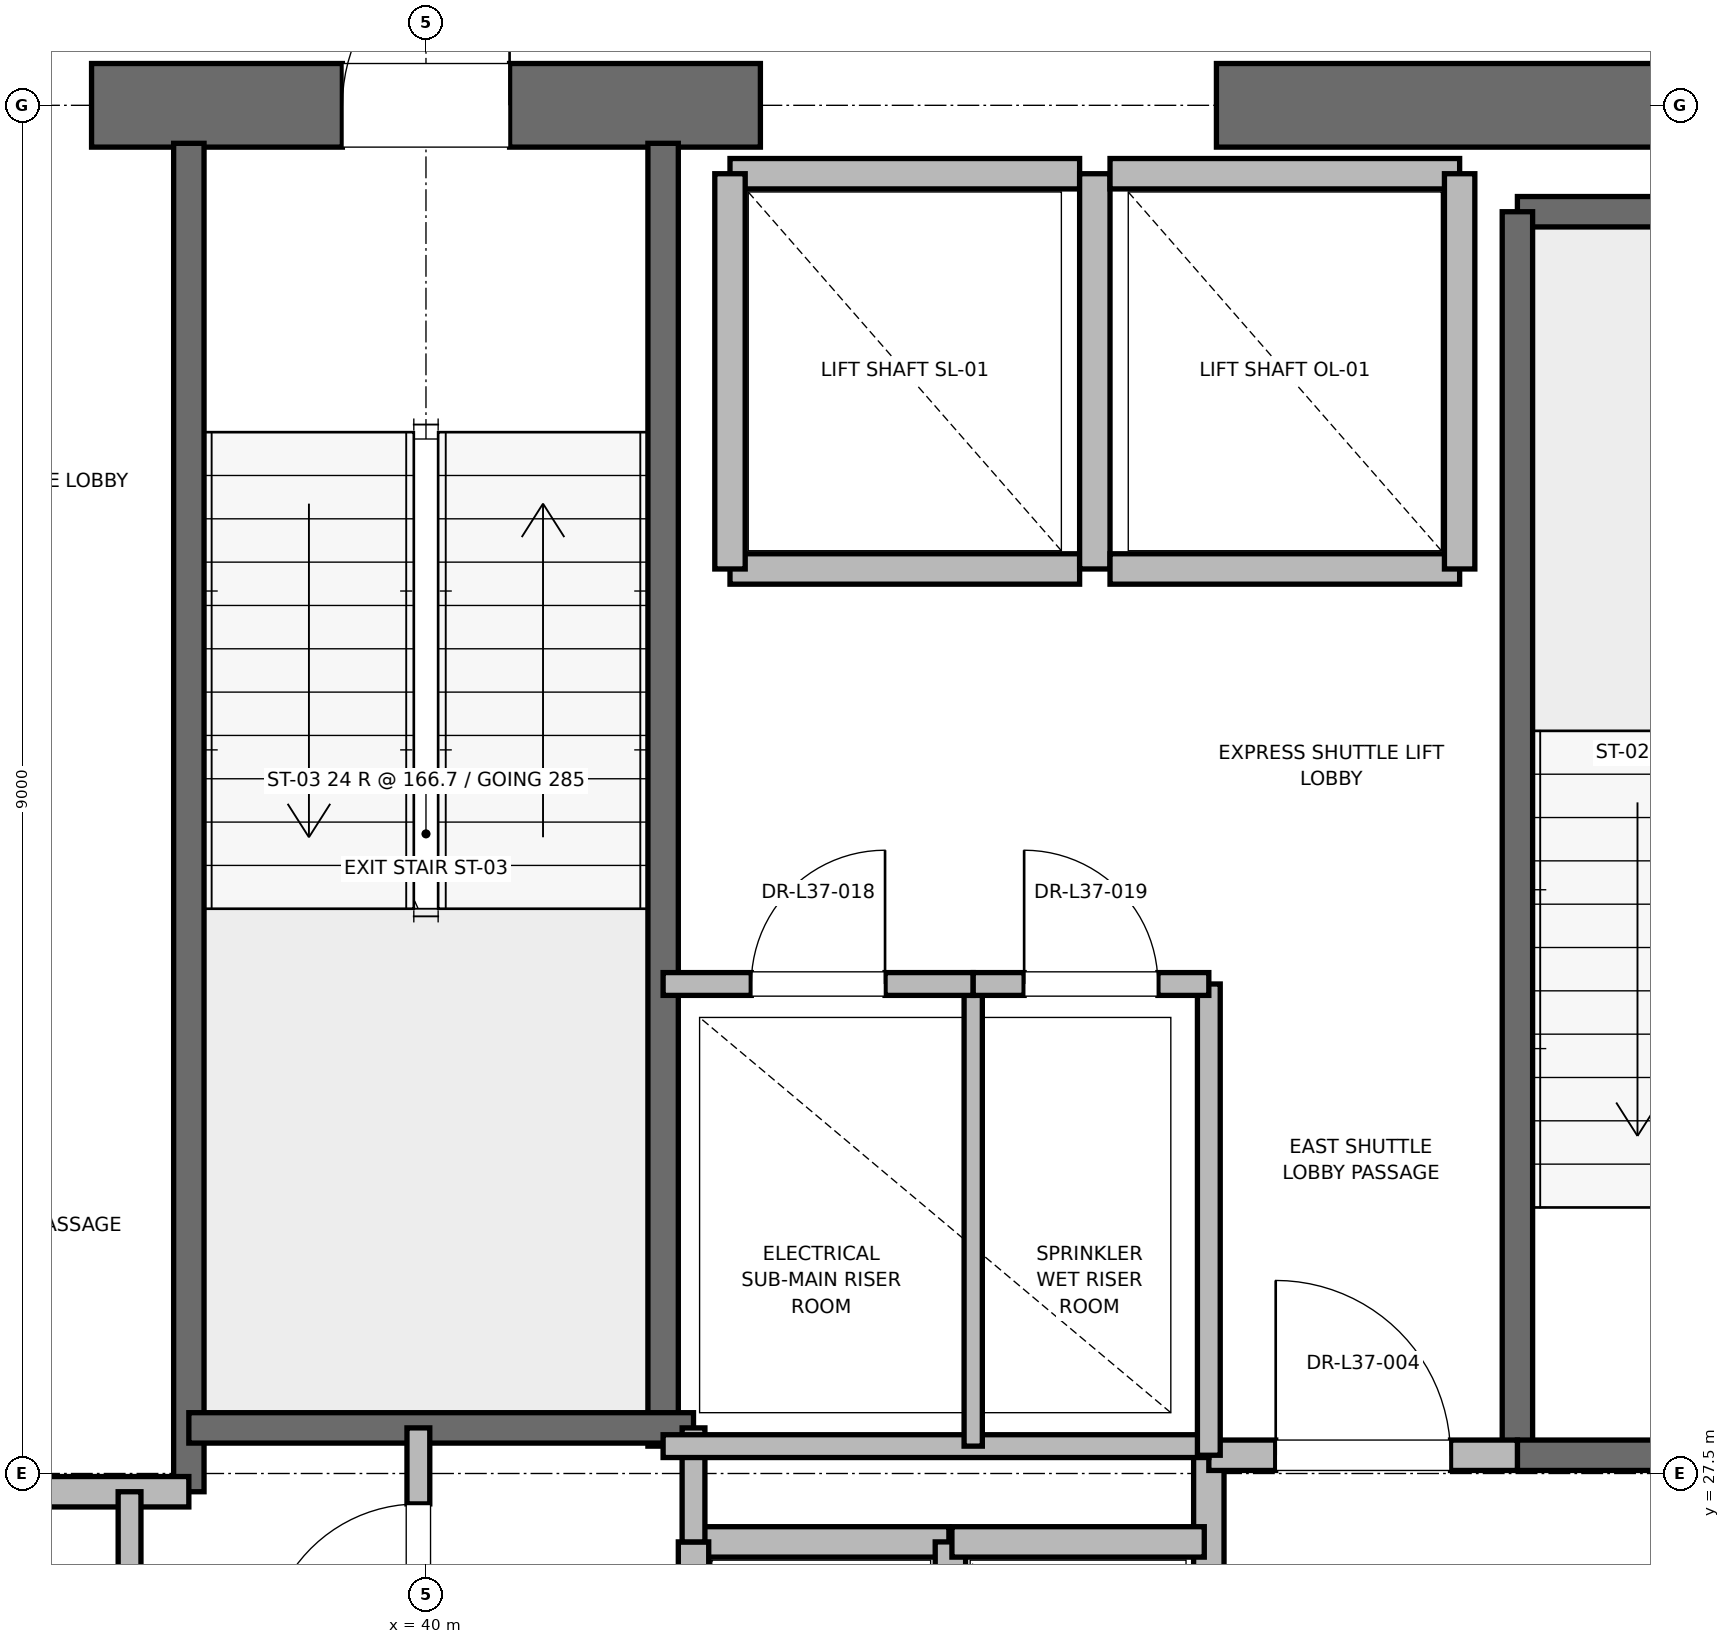
"""IFC4 building model, lengths in metres.
Left out: names, types, materials, properties, quantities, classifications, styles, units other than length and angle.
Written with IfcOpenShell. Run it as: python <this file> out.ifc"""

import sys

from ifc_helpers import new_model, si_unit, direction, frame, frame_2d, origin, place, context, subcontext, project, spatial, rectangle, extrude, element, fill, save


model = new_model("IFC4")
c1 = context("Model", 3, precision=1e-05, world=origin(), true_north=direction((0.0, 1.0)))
c2 = subcontext(c1, "Body", "Model", "MODEL_VIEW")
j1 = project(units=[si_unit("LENGTHUNIT", "METRE"), si_unit("PLANEANGLEUNIT", "RADIAN")], contexts=[c1])
p1 = place(None, origin())
s1 = spatial("IfcSite", under=j1, at=p1, CompositionType="ELEMENT")
p2 = place(p1, origin())
s2 = spatial("IfcBuilding", under=s1, at=p2, CompositionType="ELEMENT")
p3 = place(p2, frame((0.0, 0.0, 160.4)))
s3 = spatial("IfcBuildingStorey", under=s2, at=p3, CompositionType="ELEMENT", Elevation=160.4)
p4 = place(p3, frame((37.8, 36.5, 0.0), z_axis=(0.0, 0.0, 1.0), x_axis=(1.0, 0.0, 0.0)))
e1 = element("IfcWall", 1, at=p4, inside=s3, PredefinedType="SHEAR", context=c2, shape_type="SweptSolid", body=[
    extrude(rectangle(XDim=4.4, YDim=0.55, at=frame_2d((2.2, 0.0))), origin(), (0.0, 0.0, 1.0), 3.775),
])
p5 = place(p4, frame((1.65, 0.0, 0.0)))
e2 = element("IfcOpeningElement", 2, at=p5, cuts=e1, PredefinedType="OPENING", context=c2, shape_type="SweptSolid", body=[
    extrude(rectangle(XDim=1.1, YDim=2.15, at=frame_2d((0.55, 1.075))), frame((0.0, 0.275, 0.0), z_axis=(0.0, -1.0, 0.0), x_axis=(1.0, 0.0, 0.0)), (0.0, 0.0, 1.0), 0.55),
])
p6 = place(p3, frame((45.2, 36.5, 0.0), z_axis=(0.0, 0.0, 1.0), x_axis=(1.0, 0.0, 0.0)))
e3 = element("IfcWall", 3, at=p6, inside=s3, PredefinedType="SHEAR", context=c2, shape_type="SweptSolid", body=[
    extrude(rectangle(XDim=5.8, YDim=0.55, at=frame_2d((2.9, 0.0))), origin(), (0.0, 0.0, 1.0), 3.775),
])
p7 = place(p3, frame((47.18, 35.8, 0.0), z_axis=(0.0, 0.0, 1.0), x_axis=(1.0, 0.0, 0.0)))
e4 = element("IfcWall", 4, at=p7, inside=s3, PredefinedType="SOLIDWALL", context=c2, shape_type="SweptSolid", body=[
    extrude(rectangle(XDim=3.12, YDim=0.2, at=frame_2d((1.56, 0.0))), origin(), (0.0, 0.0, 1.0), 3.775),
])
p8 = place(p3, frame((47.18, 27.62, 0.0), z_axis=(0.0, 0.0, 1.0), x_axis=(0.0, 1.0, 0.0)))
e5 = element("IfcWall", 5, at=p8, inside=s3, PredefinedType="SOLIDWALL", context=c2, shape_type="SweptSolid", body=[
    extrude(rectangle(XDim=8.18, YDim=0.2, at=frame_2d((4.09, 0.0))), origin(), (0.0, 0.0, 1.0), 3.775),
])
p9 = place(p3, frame((47.18, 27.62, 0.0), z_axis=(0.0, 0.0, 1.0), x_axis=(1.0, 0.0, 0.0)))
e6 = element("IfcWall", 6, at=p9, inside=s3, PredefinedType="SOLIDWALL", context=c2, shape_type="SweptSolid", body=[
    extrude(rectangle(XDim=3.12, YDim=0.2, at=frame_2d((1.56, 0.0))), origin(), (0.0, 0.0, 1.0), 3.775),
])
p10 = place(p9, frame((1.01, 0.0, 0.0)))
e7 = element("IfcOpeningElement", 7, at=p10, cuts=e6, PredefinedType="OPENING", context=c2, shape_type="SweptSolid", body=[
    extrude(rectangle(XDim=1.1, YDim=2.15, at=frame_2d((0.55, 1.075))), frame((0.0, 0.1, 0.0), z_axis=(0.0, -1.0, 0.0), x_axis=(1.0, 0.0, 0.0)), (0.0, 0.0, 1.0), 0.2),
])
p11 = place(p3, frame((38.44, 27.38, 0.0), z_axis=(0.0, 0.0, 1.0), x_axis=(0.0, 1.0, 0.0)))
e8 = element("IfcWall", 8, at=p11, inside=s3, PredefinedType="SOLIDWALL", context=c2, shape_type="SweptSolid", body=[
    extrude(rectangle(XDim=8.87, YDim=0.2, at=frame_2d((4.435, 0.0))), origin(), (0.0, 0.0, 1.0), 3.775),
])
p12 = place(p3, frame((41.56, 27.68, 0.0), z_axis=(0.0, 0.0, 1.0), x_axis=(0.0, 1.0, 0.0)))
e9 = element("IfcWall", 9, at=p12, inside=s3, PredefinedType="SOLIDWALL", context=c2, shape_type="SweptSolid", body=[
    extrude(rectangle(XDim=8.57, YDim=0.2, at=frame_2d((4.285, 0.0))), origin(), (0.0, 0.0, 1.0), 3.775),
])
p13 = place(p3, frame((38.44, 27.8, 0.0), z_axis=(0.0, 0.0, 1.0), x_axis=(1.0, 0.0, 0.0)))
e10 = element("IfcWall", 10, at=p13, inside=s3, PredefinedType="SOLIDWALL", context=c2, shape_type="SweptSolid", body=[
    extrude(rectangle(XDim=3.32, YDim=0.2, at=frame_2d((1.66, 0.0))), origin(), (0.0, 0.0, 1.0), 3.775),
])
p14 = place(p3, frame((32.82, 27.38, 0.0), z_axis=(0.0, 0.0, 1.0), x_axis=(1.0, 0.0, 0.0)))
e11 = element("IfcWall", 11, at=p14, inside=s3, PredefinedType="PARTITIONING", context=c2, shape_type="SweptSolid", body=[
    extrude(rectangle(XDim=5.62, YDim=0.2, at=frame_2d((2.81, 0.0))), origin(), (0.0, 0.0, 1.0), 3.775),
])
p15 = place(p3, frame((45.15, 24.25, 0.0), z_axis=(0.0, 0.0, 1.0), x_axis=(0.0, 1.0, 0.0)))
e12 = element("IfcWall", 12, at=p15, inside=s3, PredefinedType="PARTITIONING", context=c2, shape_type="SweptSolid", body=[
    extrude(rectangle(XDim=3.37, YDim=0.2, at=frame_2d((1.685, 0.0))), origin(), (0.0, 0.0, 1.0), 3.775),
])
p16 = place(p3, frame((45.15, 27.62, 0.0), z_axis=(0.0, 0.0, 1.0), x_axis=(1.0, 0.0, 0.0)))
e13 = element("IfcWall", 13, at=p16, inside=s3, PredefinedType="PARTITIONING", context=c2, shape_type="SweptSolid", body=[
    extrude(rectangle(XDim=2.03, YDim=0.2, at=frame_2d((1.015, 0.0))), origin(), (0.0, 0.0, 1.0), 3.775),
])
p17 = place(p16, frame((0.44, 0.0, 0.0)))
e14 = element("IfcOpeningElement", 14, at=p17, cuts=e13, PredefinedType="OPENING", context=c2, shape_type="SweptSolid", body=[
    extrude(rectangle(XDim=1.15, YDim=2.2, at=frame_2d((0.575, 1.1))), frame((0.0, 0.1, 0.0), z_axis=(0.0, -1.0, 0.0), x_axis=(1.0, 0.0, 0.0)), (0.0, 0.0, 1.0), 0.2),
])
p18 = place(p3, frame((43.44, 27.05, 0.0), z_axis=(0.0, 0.0, 1.0), x_axis=(-1.0, 0.0, 0.0)))
e15 = element("IfcWall", 15, at=p18, inside=s3, PredefinedType="SOLIDWALL", context=c2, shape_type="SweptSolid", body=[
    extrude(rectangle(XDim=1.68, YDim=0.2, at=frame_2d((0.84, 0.0))), origin(), (0.0, 0.0, 1.0), 3.775),
])
for number, where, z_axis, x_axis in (
    (16, (41.76, 27.05, 0.0), (0.0, 0.0, 1.0), (0.0, -1.0, 0.0)),
    (17, (43.45, 24.45, 0.0), (0.0, 0.0, 1.0), (0.0, 1.0, 0.0)),
):
    element("IfcWall", number, at=place(p3, frame(where, z_axis=z_axis, x_axis=x_axis)), inside=s3, PredefinedType="SOLIDWALL", context=c2, shape_type="SweptSolid", body=[
        extrude(rectangle(XDim=2.6, YDim=0.2, at=frame_2d((1.3, 0.0))), origin(), (0.0, 0.0, 1.0), 3.775),
    ])
p19 = place(p3, frame((45.12, 27.05, 0.0), z_axis=(0.0, 0.0, 1.0), x_axis=(-1.0, 0.0, 0.0)))
e18 = element("IfcWall", 18, at=p19, inside=s3, PredefinedType="SOLIDWALL", context=c2, shape_type="SweptSolid", body=[
    extrude(rectangle(XDim=1.66, YDim=0.2, at=frame_2d((0.83, 0.0))), origin(), (0.0, 0.0, 1.0), 3.775),
])
p20 = place(p3, frame((42.0, 33.45, 0.0), z_axis=(0.0, 0.0, 1.0), x_axis=(1.0, 0.0, 0.0)))
e19 = element("IfcWall", 19, at=p20, inside=s3, PredefinedType="SOLIDWALL", context=c2, shape_type="SweptSolid", body=[
    extrude(rectangle(XDim=2.3, YDim=0.2, at=frame_2d((1.15, 0.0))), origin(), (0.0, 0.0, 1.0), 3.775),
])
p21 = place(p3, frame((44.3, 36.05, 0.0), z_axis=(0.0, 0.0, 1.0), x_axis=(-1.0, 0.0, 0.0)))
e20 = element("IfcWall", 20, at=p21, inside=s3, PredefinedType="SOLIDWALL", context=c2, shape_type="SweptSolid", body=[
    extrude(rectangle(XDim=2.3, YDim=0.2, at=frame_2d((1.15, 0.0))), origin(), (0.0, 0.0, 1.0), 2.755),
])
for number, where, z_axis, x_axis in (
    (21, (42.0, 36.05, 0.0), (0.0, 0.0, 1.0), (0.0, -1.0, 0.0)),
    (22, (44.4, 33.45, 0.0), (0.0, 0.0, 1.0), (0.0, 1.0, 0.0)),
):
    element("IfcWall", number, at=place(p3, frame(where, z_axis=z_axis, x_axis=x_axis)), inside=s3, PredefinedType="SOLIDWALL", context=c2, shape_type="SweptSolid", body=[
        extrude(rectangle(XDim=2.6, YDim=0.2, at=frame_2d((1.3, 0.0))), origin(), (0.0, 0.0, 1.0), 2.755),
    ])
p22 = place(p3, frame((44.5, 33.45, 0.0), z_axis=(0.0, 0.0, 1.0), x_axis=(1.0, 0.0, 0.0)))
e23 = element("IfcWall", 23, at=p22, inside=s3, PredefinedType="SOLIDWALL", context=c2, shape_type="SweptSolid", body=[
    extrude(rectangle(XDim=2.3, YDim=0.2, at=frame_2d((1.15, 0.0))), origin(), (0.0, 0.0, 1.0), 3.775),
])
p23 = place(p3, frame((46.8, 36.05, 0.0), z_axis=(0.0, 0.0, 1.0), x_axis=(-1.0, 0.0, 0.0)))
e24 = element("IfcWall", 24, at=p23, inside=s3, PredefinedType="SOLIDWALL", context=c2, shape_type="SweptSolid", body=[
    extrude(rectangle(XDim=2.3, YDim=0.2, at=frame_2d((1.15, 0.0))), origin(), (0.0, 0.0, 1.0), 2.755),
])
p24 = place(p3, frame((46.8, 33.45, 0.0), z_axis=(0.0, 0.0, 1.0), x_axis=(0.0, 1.0, 0.0)))
e25 = element("IfcWall", 25, at=p24, inside=s3, PredefinedType="SOLIDWALL", context=c2, shape_type="SweptSolid", body=[
    extrude(rectangle(XDim=2.6, YDim=0.2, at=frame_2d((1.3, 0.0))), origin(), (0.0, 0.0, 1.0), 3.775),
])
p25 = place(p3, frame((41.76, 27.05, 0.0), z_axis=(0.0, 0.0, 1.0), x_axis=(0.0, 1.0, 0.0)))
e26 = element("IfcWall", 26, at=p25, inside=s3, PredefinedType="PARTITIONING", context=c2, shape_type="SweptSolid", body=[
    extrude(rectangle(XDim=0.75, YDim=0.15, at=frame_2d((0.375, 0.0))), origin(), (0.0, 0.0, 1.0), 2.85),
])
p26 = place(p3, frame((39.95, 25.8, 0.0), z_axis=(0.0, 0.0, 1.0), x_axis=(0.0, 1.0, 0.0)))
e27 = element("IfcWall", 27, at=p26, inside=s3, PredefinedType="PARTITIONING", context=c2, shape_type="SweptSolid", body=[
    extrude(rectangle(XDim=2.0, YDim=0.15, at=frame_2d((1.0, 0.0))), origin(), (0.0, 0.0, 1.0), 2.85),
])
p27 = place(p26, frame((0.5, 0.0, 0.0)))
e28 = element("IfcOpeningElement", 28, at=p27, cuts=e27, PredefinedType="OPENING", context=c2, shape_type="SweptSolid", body=[
    extrude(rectangle(XDim=1.0, YDim=2.15, at=frame_2d((0.5, 1.075))), frame((0.0, 0.075, 0.0), z_axis=(0.0, -1.0, 0.0), x_axis=(1.0, 0.0, 0.0)), (0.0, 0.0, 1.0), 0.15),
])
p28 = place(p3, frame((38.05, 24.5, 0.0), z_axis=(0.0, 0.0, 1.0), x_axis=(0.0, 1.0, 0.0)))
e29 = element("IfcWall", 29, at=p28, inside=s3, PredefinedType="PARTITIONING", context=c2, shape_type="SweptSolid", body=[
    extrude(rectangle(XDim=2.88, YDim=0.15, at=frame_2d((1.44, 0.0))), origin(), (0.0, 0.0, 1.0), 2.85),
])
p29 = place(p28, frame((0.94, 0.0, 0.0)))
e30 = element("IfcOpeningElement", 30, at=p29, cuts=e29, PredefinedType="OPENING", context=c2, shape_type="SweptSolid", body=[
    extrude(rectangle(XDim=1.0, YDim=2.15, at=frame_2d((0.5, 1.075))), frame((0.0, 0.075, 0.0), z_axis=(0.0, -1.0, 0.0), x_axis=(1.0, 0.0, 0.0)), (0.0, 0.0, 1.0), 0.15),
])
p30 = place(p3, frame((41.56, 27.68, 0.0), z_axis=(0.0, 0.0, 1.0), x_axis=(1.0, 0.0, 0.0)))
e31 = element("IfcWall", 31, at=p30, inside=s3, PredefinedType="PARTITIONING", context=c2, shape_type="SweptSolid", body=[
    extrude(rectangle(XDim=3.59, YDim=0.15, at=frame_2d((1.795, 0.0))), origin(), (0.0, 0.0, 1.0), 2.85),
])
p31 = place(p3, frame((45.15, 27.62, 0.0), z_axis=(0.0, 0.0, 1.0), x_axis=(0.0, 1.0, 0.0)))
e32 = element("IfcWall", 32, at=p31, inside=s3, PredefinedType="PARTITIONING", context=c2, shape_type="SweptSolid", body=[
    extrude(rectangle(XDim=3.1, YDim=0.15, at=frame_2d((1.55, 0.0))), origin(), (0.0, 0.0, 1.0), 2.85),
])
p32 = place(p3, frame((43.6, 27.68, 0.0), z_axis=(0.0, 0.0, 1.0), x_axis=(0.0, 1.0, 0.0)))
e33 = element("IfcWall", 33, at=p32, inside=s3, PredefinedType="PARTITIONING", context=c2, shape_type="SweptSolid", body=[
    extrude(rectangle(XDim=3.04, YDim=0.12, at=frame_2d((1.52, 0.0))), origin(), (0.0, 0.0, 1.0), 2.85),
])
p33 = place(p3, frame((41.56, 30.72, 0.0), z_axis=(0.0, 0.0, 1.0), x_axis=(1.0, 0.0, 0.0)))
e34 = element("IfcWall", 34, at=p33, inside=s3, PredefinedType="PARTITIONING", context=c2, shape_type="SweptSolid", body=[
    extrude(rectangle(XDim=2.04, YDim=0.15, at=frame_2d((1.02, 0.0))), origin(), (0.0, 0.0, 1.0), 2.85),
])
p34 = place(p33, frame((0.58, 0.0, 0.0)))
e35 = element("IfcOpeningElement", 35, at=p34, cuts=e34, PredefinedType="OPENING", context=c2, shape_type="SweptSolid", body=[
    extrude(rectangle(XDim=0.88, YDim=2.1, at=frame_2d((0.44, 1.05))), frame((0.0, 0.075, 0.0), z_axis=(0.0, -1.0, 0.0), x_axis=(1.0, 0.0, 0.0)), (0.0, 0.0, 1.0), 0.15),
])
p35 = place(p3, frame((43.6, 30.72, 0.0), z_axis=(0.0, 0.0, 1.0), x_axis=(1.0, 0.0, 0.0)))
e36 = element("IfcWall", 36, at=p35, inside=s3, PredefinedType="PARTITIONING", context=c2, shape_type="SweptSolid", body=[
    extrude(rectangle(XDim=1.55, YDim=0.15, at=frame_2d((0.775, 0.0))), origin(), (0.0, 0.0, 1.0), 2.85),
])
p36 = place(p35, frame((0.335, 0.0, 0.0)))
e37 = element("IfcOpeningElement", 37, at=p36, cuts=e36, PredefinedType="OPENING", context=c2, shape_type="SweptSolid", body=[
    extrude(rectangle(XDim=0.88, YDim=2.1, at=frame_2d((0.44, 1.05))), frame((0.0, 0.075, 0.0), z_axis=(0.0, -1.0, 0.0), x_axis=(1.0, 0.0, 0.0)), (0.0, 0.0, 1.0), 0.15),
])
p37 = place(p5, origin())
e38 = element("IfcDoor", 38, at=p37, inside=s3, OperationType="SINGLE_SWING_RIGHT", PredefinedType="DOOR", context=c2, shape_type="SweptSolid", body=[
    extrude(rectangle(XDim=1.1, YDim=2.15, at=frame_2d((0.55, 1.075))), frame((0.0, 0.025, 0.0), z_axis=(0.0, -1.0, 0.0), x_axis=(1.0, 0.0, 0.0)), (0.0, 0.0, 1.0), 0.05),
])
fill(e2, e38)
p38 = place(p17, origin())
e39 = element("IfcDoor", 39, at=p38, inside=s3, OperationType="SINGLE_SWING_LEFT", PredefinedType="DOOR", context=c2, shape_type="SweptSolid", body=[
    extrude(rectangle(XDim=1.15, YDim=2.2, at=frame_2d((0.575, 1.1))), frame((0.0, 0.025, 0.0), z_axis=(0.0, -1.0, 0.0), x_axis=(1.0, 0.0, 0.0)), (0.0, 0.0, 1.0), 0.05),
])
fill(e14, e39)
p39 = place(p27, origin())
e40 = element("IfcDoor", 40, at=p39, inside=s3, OperationType="SINGLE_SWING_LEFT", PredefinedType="DOOR", context=c2, shape_type="SweptSolid", body=[
    extrude(rectangle(XDim=1.0, YDim=2.15, at=frame_2d((0.5, 1.075))), frame((0.0, 0.025, 0.0), z_axis=(0.0, -1.0, 0.0), x_axis=(1.0, 0.0, 0.0)), (0.0, 0.0, 1.0), 0.05),
])
fill(e28, e40)
p40 = place(p34, origin())
e41 = element("IfcDoor", 41, at=p40, inside=s3, OperationType="SINGLE_SWING_RIGHT", PredefinedType="DOOR", context=c2, shape_type="SweptSolid", body=[
    extrude(rectangle(XDim=0.88, YDim=2.1, at=frame_2d((0.44, 1.05))), frame((0.0, 0.025, 0.0), z_axis=(0.0, -1.0, 0.0), x_axis=(1.0, 0.0, 0.0)), (0.0, 0.0, 1.0), 0.05),
])
fill(e35, e41)
p41 = place(p36, origin())
e42 = element("IfcDoor", 42, at=p41, inside=s3, OperationType="SINGLE_SWING_LEFT", PredefinedType="DOOR", context=c2, shape_type="SweptSolid", body=[
    extrude(rectangle(XDim=0.88, YDim=2.1, at=frame_2d((0.44, 1.05))), frame((0.0, 0.025, 0.0), z_axis=(0.0, -1.0, 0.0), x_axis=(1.0, 0.0, 0.0)), (0.0, 0.0, 1.0), 0.05),
])
fill(e37, e42)
save(model, sys.argv[1])
